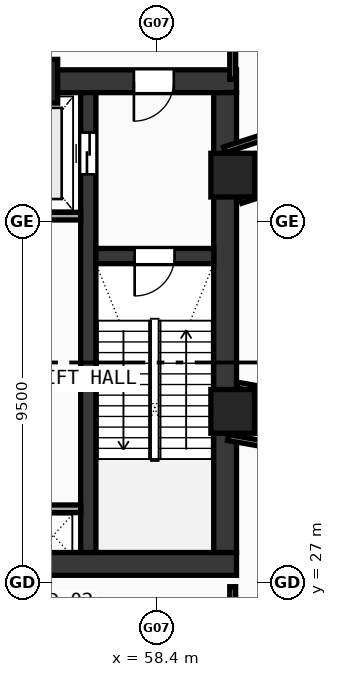
"""IFC4 building model, lengths in metres.
Left out: names, types, materials, properties, quantities, classifications, styles, units other than length and angle.
Written with IfcOpenShell. Run it as: python <this file> out.ifc"""

import sys

from ifc_helpers import new_model, si_unit, direction, frame, frame_2d, origin, origin_with_axes, origin_2d, place, context, subcontext, project, spatial, rectangle, hollow_rectangle, extrude, source, transform, mapped, element, fill, save


model = new_model("IFC4")
c1 = context("Model", 3, precision=1e-05, world=origin(), true_north=direction((0.0, 1.0)))
c2 = subcontext(c1, "Body", "Model", "MODEL_VIEW")
j1 = project(units=[si_unit("LENGTHUNIT", "METRE"), si_unit("PLANEANGLEUNIT", "RADIAN")], contexts=[c1])
p1 = place(None, origin())
s1 = spatial("IfcSite", under=j1, at=p1, CompositionType="ELEMENT")
p2 = place(p1, origin())
s2 = spatial("IfcBuilding", under=s1, at=p2, CompositionType="ELEMENT")
p3 = place(p2, frame((0.0, 0.0, 176.16)))
s3 = spatial("IfcBuildingStorey", under=s2, at=p3, CompositionType="ELEMENT", Elevation=176.16)
p4 = place(p3, frame((35.5, 27.5, 0.0), z_axis=(0.0, 0.0, 1.0), x_axis=(1.0, 0.0, 0.0)))
e1 = element("IfcWall", 1, at=p4, inside=s3, PredefinedType="SHEAR", context=c2, shape_type="SweptSolid", body=[
    extrude(rectangle(XDim=25.0, YDim=0.6, at=frame_2d((12.5, 0.0))), origin(), (0.0, 0.0, 1.0), 4.54),
])
p5 = place(p4, frame((4.65, 0.0, 0.0)))
e2 = element("IfcOpeningElement", 2, at=p5, cuts=e1, PredefinedType="OPENING", context=c2, shape_type="SweptSolid", body=[
    extrude(rectangle(XDim=1.05, YDim=2.1, at=frame_2d((0.525, 1.05))), frame((0.0, 0.31, 0.0), z_axis=(0.0, -1.0, 0.0), x_axis=(1.0, 0.0, 0.0)), (0.0, 0.0, 1.0), 0.62),
])
p6 = place(p3, frame((49.2, 40.2, 0.0), z_axis=(0.0, 0.0, 1.0), x_axis=(1.0, 0.0, 0.0)))
e3 = element("IfcWall", 3, at=p6, inside=s3, PredefinedType="SHEAR", context=c2, shape_type="SweptSolid", body=[
    extrude(rectangle(XDim=11.3, YDim=0.6, at=frame_2d((5.65, 0.0))), origin(), (0.0, 0.0, 1.0), 4.54),
])
p7 = place(p6, frame((8.6, 0.0, 0.0)))
e4 = element("IfcOpeningElement", 4, at=p7, cuts=e3, PredefinedType="OPENING", context=c2, shape_type="SweptSolid", body=[
    extrude(rectangle(XDim=1.05, YDim=2.1, at=frame_2d((0.525, 1.05))), frame((0.0, 0.31, 0.0), z_axis=(0.0, -1.0, 0.0), x_axis=(1.0, 0.0, 0.0)), (0.0, 0.0, 1.0), 0.62),
])
p8 = place(p3, frame((60.2, 27.8, 0.0), z_axis=(0.0, 0.0, 1.0), x_axis=(0.0, 1.0, 0.0)))
e5 = element("IfcWall", 5, at=p8, inside=s3, PredefinedType="SHEAR", context=c2, shape_type="SweptSolid", body=[
    extrude(rectangle(XDim=12.1, YDim=0.6, at=frame_2d((6.05, 0.0))), origin(), (0.0, 0.0, 1.0), 4.54),
])
p9 = place(p3, frame((56.6, 27.8, 0.0), z_axis=(0.0, 0.0, 1.0), x_axis=(0.0, 1.0, 0.0)))
e6 = element("IfcWall", 6, at=p9, inside=s3, PredefinedType="SHEAR", context=c2, shape_type="SweptSolid", body=[
    extrude(rectangle(XDim=12.1, YDim=0.4, at=frame_2d((6.05, 0.0))), origin(), (0.0, 0.0, 1.0), 4.54),
])
p10 = place(p9, frame((9.95, 0.0, 0.0)))
e7 = element("IfcOpeningElement", 7, at=p10, cuts=e6, PredefinedType="OPENING", context=c2, shape_type="SweptSolid", body=[
    extrude(rectangle(XDim=1.1, YDim=2.1, at=frame_2d((0.55, 1.05))), frame((0.0, 0.21, 0.0), z_axis=(0.0, -1.0, 0.0), x_axis=(1.0, 0.0, 0.0)), (0.0, 0.0, 1.0), 0.42),
])
p11 = place(p3, frame((56.8, 35.6, 0.0), z_axis=(0.0, 0.0, 1.0), x_axis=(1.0, 0.0, 0.0)))
e8 = element("IfcWall", 8, at=p11, inside=s3, PredefinedType="SHEAR", context=c2, shape_type="SweptSolid", body=[
    extrude(rectangle(XDim=3.1, YDim=0.4, at=frame_2d((1.55, 0.0))), origin(), (0.0, 0.0, 1.0), 4.54),
])
p12 = place(p11, frame((1.02, 0.0, 0.0)))
e9 = element("IfcOpeningElement", 9, at=p12, cuts=e8, PredefinedType="OPENING", context=c2, shape_type="SweptSolid", body=[
    extrude(rectangle(XDim=1.05, YDim=2.1, at=frame_2d((0.525, 1.05))), frame((0.0, 0.21, 0.0), z_axis=(0.0, -1.0, 0.0), x_axis=(1.0, 0.0, 0.0)), (0.0, 0.0, 1.0), 0.42),
])
m1 = source(origin(), c2, "Body", "SweptSolid", [
    extrude(hollow_rectangle(XDim=1.15, YDim=1.15, WallThickness=0.048, at=origin_2d()), origin(), (0.0, 0.0, 1.0), 4.82),
])
for number, where, z_axis, x_axis in (
    (10, (60.4, 31.513, -0.28), (0.0, 0.0, 1.0), (1.0, 0.0, 0.0)),
    (11, (60.4, 37.729, -0.28), (0.0, 0.0, 1.0), (1.0, 0.0, 0.0)),
    (12, (55.219, 40.2, -0.28), (0.0, 0.0, 1.0), (1.0, 0.0, 0.0)),
):
    element("IfcColumn", number, at=place(p3, frame(where, z_axis=z_axis, x_axis=x_axis)), inside=s3, PredefinedType="COLUMN", context=c2, shape_type="MappedRepresentation", body=[
        mapped(m1, transform((0.0, 0.0, 0.0), scale=1.0)),
    ])
p13 = place(p3, frame((53.68, 36.65, 0.0), z_axis=(0.0, 0.0, 1.0), x_axis=(1.0, 0.0, 0.0)))
e13 = element("IfcWall", 13, at=p13, inside=s3, PredefinedType="SOLIDWALL", context=c2, shape_type="SweptSolid", body=[
    extrude(rectangle(XDim=2.72, YDim=0.2, at=frame_2d((1.36, 0.0))), origin(), (0.0, 0.0, 1.0), 4.54),
])
p14 = place(p3, frame((55.12, 28.95, 0.0), z_axis=(0.0, 0.0, 1.0), x_axis=(1.0, 0.0, 0.0)))
e14 = element("IfcWall", 14, at=p14, inside=s3, PredefinedType="SOLIDWALL", context=c2, shape_type="SweptSolid", body=[
    extrude(rectangle(XDim=1.28, YDim=0.2, at=frame_2d((0.64, 0.0))), origin(), (0.0, 0.0, 1.0), 4.54),
])
p15 = place(p3, frame((60.278, 30.824, 0.0), z_axis=(0.0, 0.0, 1.0), x_axis=(0.984808792437, -0.173642282695, 0.0)))
e15 = element("IfcWall", 15, at=p15, inside=s3, PredefinedType="PARTITIONING", context=c2, shape_type="SweptSolid", body=[
    extrude(rectangle(XDim=25.996, YDim=0.155, at=frame_2d((12.998, 0.0))), origin(), (0.0, 0.0, 1.0), 3.89),
])
p16 = place(p3, frame((60.521, 32.203, 0.0), z_axis=(0.0, 0.0, 1.0), x_axis=(0.984809178547, -0.173640092865, 0.0)))
e16 = element("IfcWall", 16, at=p16, inside=s3, PredefinedType="PARTITIONING", context=c2, shape_type="SweptSolid", body=[
    extrude(rectangle(XDim=25.124, YDim=0.155, at=frame_2d((12.562, 0.0))), origin(), (0.0, 0.0, 1.0), 3.89),
])
p17 = place(p3, frame((60.616, 37.063, 0.0), z_axis=(0.0, 0.0, 1.0), x_axis=(0.951056691926, 0.309016453838, 0.0)))
e17 = element("IfcWall", 17, at=p17, inside=s3, PredefinedType="PARTITIONING", context=c2, shape_type="SweptSolid", body=[
    extrude(rectangle(XDim=19.19, YDim=0.155, at=frame_2d((9.595, 0.0))), origin(), (0.0, 0.0, 1.0), 3.89),
])
p18 = place(p3, frame((60.184, 38.395, 0.0), z_axis=(0.0, 0.0, 1.0), x_axis=(0.951055361724, 0.309020547758, 0.0)))
e18 = element("IfcWall", 18, at=p18, inside=s3, PredefinedType="PARTITIONING", context=c2, shape_type="SweptSolid", body=[
    extrude(rectangle(XDim=18.956, YDim=0.155, at=frame_2d((9.478, 0.0))), origin(), (0.0, 0.0, 1.0), 3.89),
])
p19 = place(p3, frame((60.4, 42.8, 0.0), z_axis=(0.0, 0.0, 1.0), x_axis=(0.0, -1.0, 0.0)))
e19 = element("IfcWall", 19, at=p19, inside=s3, PredefinedType="PARTITIONING", context=c2, shape_type="SweptSolid", body=[
    extrude(rectangle(XDim=2.55, YDim=0.155, at=frame_2d((1.275, 0.0))), origin(), (0.0, 0.0, 1.0), 4.54),
])
p20 = place(p3, frame((60.4, 26.9, 0.0), z_axis=(0.0, 0.0, 1.0), x_axis=(0.0, -1.0, 0.0)))
e20 = element("IfcWall", 20, at=p20, inside=s3, PredefinedType="PARTITIONING", context=c2, shape_type="SweptSolid", body=[
    extrude(rectangle(XDim=2.0, YDim=0.155, at=frame_2d((1.0, 0.0))), origin(), (0.0, 0.0, 1.0), 4.14),
])
m2 = source(origin(), c2, "Body", "SweptSolid", [
    extrude(rectangle(XDim=1.05, YDim=2.1, at=frame_2d((0.525, 1.05))), frame((0.0, 0.025, 0.0), z_axis=(0.0, -1.0, 0.0), x_axis=(1.0, 0.0, 0.0)), (0.0, 0.0, 1.0), 0.05),
])
p21 = place(p12, frame((1.05, 0.0, 0.0), z_axis=(0.0, 0.0, 1.0), x_axis=(-1.0, 0.0, 0.0)))
e21 = element("IfcDoor", 21, at=p21, inside=s3, OperationType="SINGLE_SWING_RIGHT", PredefinedType="DOOR", context=c2, shape_type="MappedRepresentation", body=[
    mapped(m2, transform((0.0, 0.0, 0.0), scale=1.0)),
])
fill(e9, e21)
p22 = place(p7, frame((1.05, 0.0, 0.0), z_axis=(0.0, 0.0, 1.0), x_axis=(-1.0, 0.0, 0.0)))
e22 = element("IfcDoor", 22, at=p22, inside=s3, OperationType="SINGLE_SWING_RIGHT", PredefinedType="DOOR", context=c2, shape_type="MappedRepresentation", body=[
    mapped(m2, transform((0.0, 0.0, 0.0), scale=1.0)),
])
fill(e4, e22)
m3 = source(origin(), c2, "Body", "SweptSolid", [
    extrude(rectangle(XDim=1.1, YDim=2.1, at=frame_2d((0.55, 1.05))), frame((0.0, 0.025, 0.0), z_axis=(0.0, -1.0, 0.0), x_axis=(1.0, 0.0, 0.0)), (0.0, 0.0, 1.0), 0.05),
])
p23 = place(p10, origin_with_axes())
e23 = element("IfcDoor", 23, at=p23, inside=s3, OperationType="DOUBLE_DOOR_SLIDING", PredefinedType="DOOR", context=c2, shape_type="MappedRepresentation", body=[
    mapped(m3, transform((0.0, 0.0, 0.0), scale=1.0)),
])
fill(e7, e23)
save(model, sys.argv[1])
